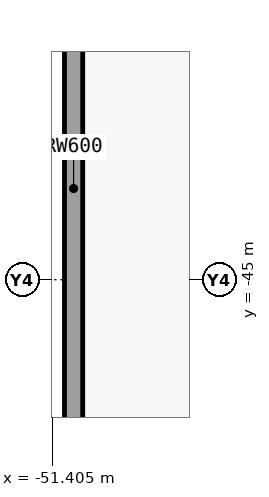
"""IFC4 building model, lengths in metres.
Left out: names, types, materials, properties, quantities, classifications, styles, units other than length and angle.
Written with IfcOpenShell. Run it as: python <this file> out.ifc"""

import sys

from ifc_helpers import new_model, si_unit, direction, frame, origin, place, context, subcontext, project, spatial, polyline, outline, extrude, element, save


model = new_model("IFC4")
c1 = context("Model", 3, precision=1e-05, world=origin(), true_north=direction((0.0, 1.0)))
c2 = subcontext(c1, "Body", "Model", "MODEL_VIEW")
j1 = project(units=[si_unit("LENGTHUNIT", "METRE"), si_unit("PLANEANGLEUNIT", "RADIAN")], contexts=[c1])
p1 = place(None, origin())
s1 = spatial("IfcSite", under=j1, at=p1, CompositionType="ELEMENT")
p2 = place(p1, origin())
s2 = spatial("IfcBuilding", under=s1, at=p2, CompositionType="ELEMENT")
p3 = place(p2, frame((0.0, 0.0, -4.5)))
s3 = spatial("IfcBuildingStorey", under=s2, at=p3, CompositionType="ELEMENT", Elevation=-4.5)
p4 = place(p3, frame((-50.7, -1.0, 0.0), z_axis=(0.0, 0.0, 1.0), x_axis=(0.0, -1.0, 0.0)))
e1 = element("IfcWall", 1, at=p4, inside=s3, PredefinedType="SOLIDWALL", context=c2, shape_type="SweptSolid", body=[
    extrude(outline(polyline([(81.4, 0.3), (81.4, -0.3), (0.6, -0.3), (0.6, 0.3), (81.4, 0.3)])), origin(), (0.0, 0.0, 1.0), 4.5),
])
save(model, sys.argv[1])
